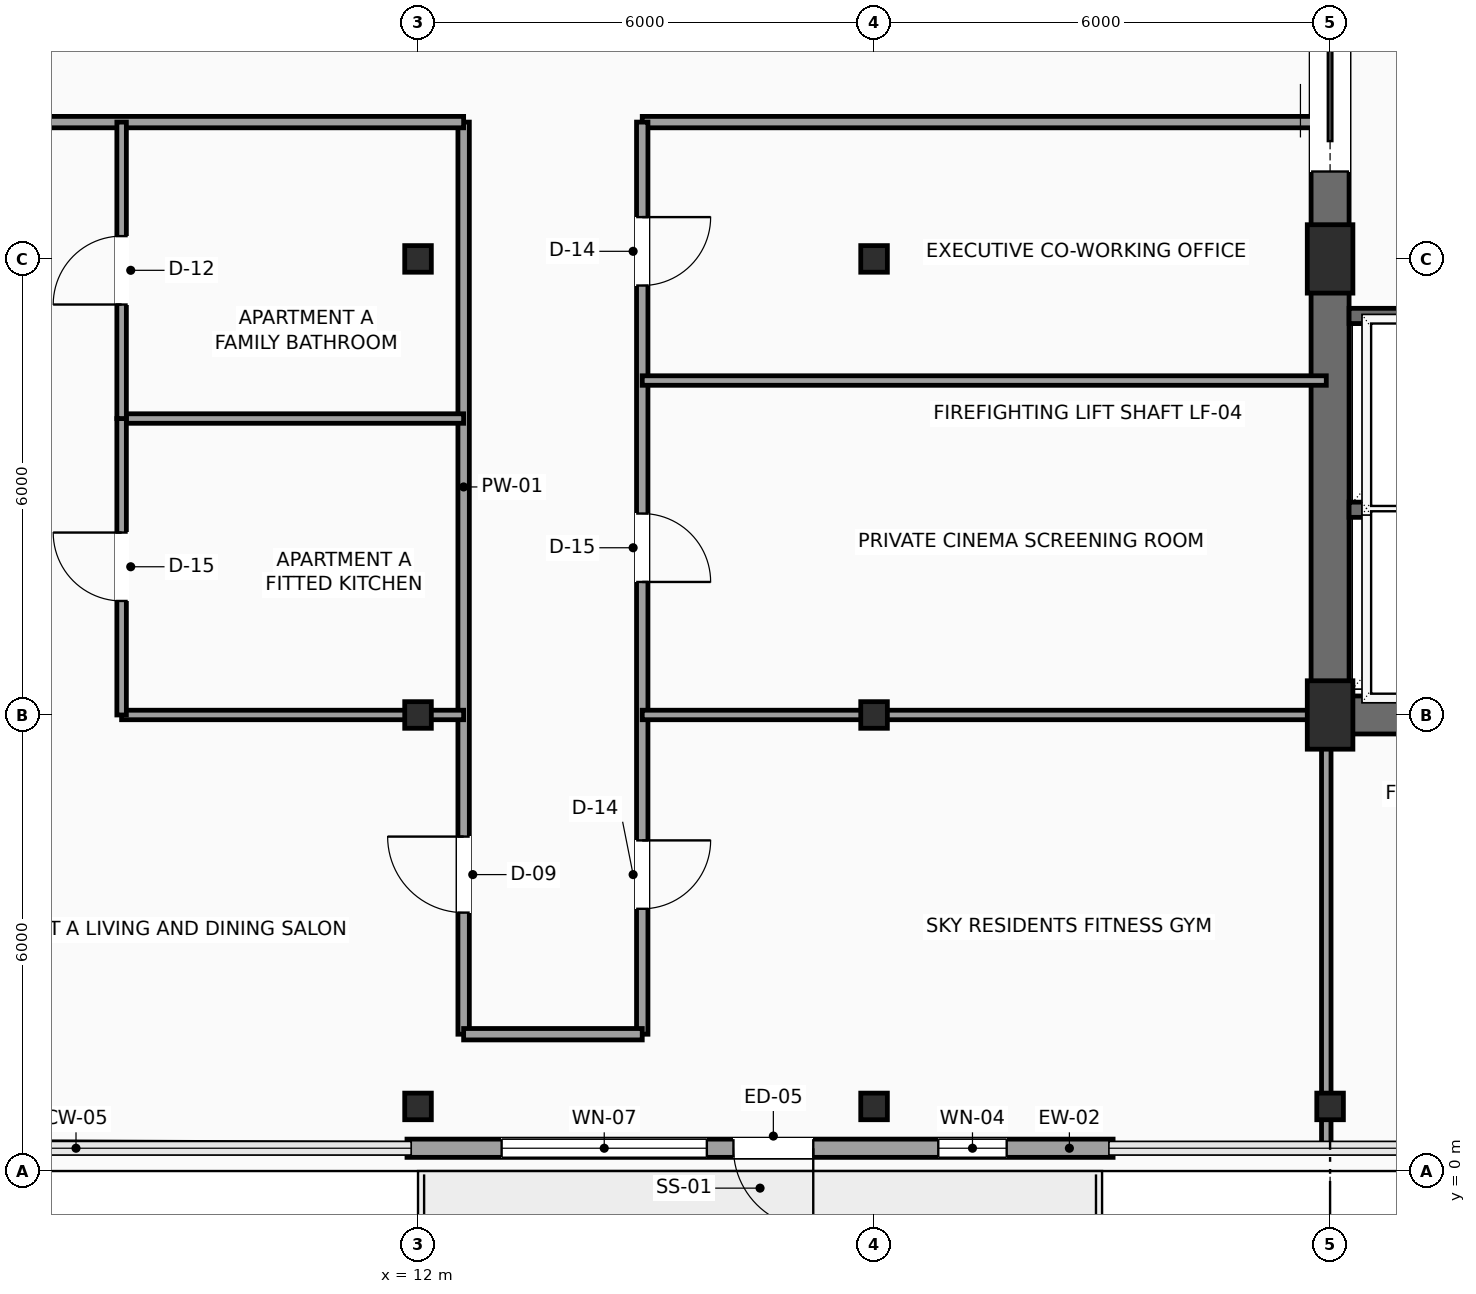
"""IFC4 building model, lengths in metres.
Left out: names, types, materials, properties, quantities, classifications, styles, units other than length and angle.
Written with IfcOpenShell. Run it as: python <this file> out.ifc"""

import sys

from ifc_helpers import new_model, si_unit, direction, frame, frame_2d, origin, origin_2d, place, context, subcontext, project, spatial, rectangle, hollow_rectangle, extrude, element, fill, save


model = new_model("IFC4")
c1 = context("Model", 3, precision=1e-05, world=origin(), true_north=direction((0.0, 1.0)))
c2 = subcontext(c1, "Body", "Model", "MODEL_VIEW")
j1 = project(units=[si_unit("LENGTHUNIT", "METRE"), si_unit("PLANEANGLEUNIT", "RADIAN")], contexts=[c1])
p1 = place(None, origin())
s1 = spatial("IfcSite", under=j1, at=p1, CompositionType="ELEMENT")
p2 = place(p1, origin())
s2 = spatial("IfcBuilding", under=s1, at=p2, CompositionType="ELEMENT")
p3 = place(p2, frame((0.0, 0.0, 267.7)))
s3 = spatial("IfcBuildingStorey", under=s2, at=p3, CompositionType="ELEMENT", Elevation=267.7)
for number, where, z_axis, x_axis in (
    (1, (24.0, 6.0, 0.0), (0.0, 0.0, 1.0), (1.0, 0.0, 0.0)),
    (2, (24.0, 12.0, 0.0), (0.0, 0.0, 1.0), (1.0, 0.0, 0.0)),
):
    element("IfcColumn", number, at=place(p3, frame(where, z_axis=z_axis, x_axis=x_axis)), inside=s3, PredefinedType="COLUMN", context=c2, shape_type="SweptSolid", body=[
        extrude(rectangle(XDim=0.6, YDim=0.9, at=origin_2d()), origin(), (0.0, 0.0, 1.0), 3.5),
    ])
for number, where, z_axis, x_axis in (
    (3, (12.0, 0.85, 0.0), (0.0, 0.0, 1.0), (1.0, 0.0, 0.0)),
    (4, (12.0, 6.0, 0.0), (0.0, 0.0, 1.0), (1.0, 0.0, 0.0)),
    (5, (12.0, 12.0, 0.0), (0.0, 0.0, 1.0), (1.0, 0.0, 0.0)),
    (6, (18.0, 0.85, 0.0), (0.0, 0.0, 1.0), (1.0, 0.0, 0.0)),
    (7, (18.0, 6.0, 0.0), (0.0, 0.0, 1.0), (1.0, 0.0, 0.0)),
    (8, (18.0, 12.0, 0.0), (0.0, 0.0, 1.0), (1.0, 0.0, 0.0)),
    (9, (24.0, 0.85, 0.0), (0.0, 0.0, 1.0), (1.0, 0.0, 0.0)),
):
    element("IfcColumn", number, at=place(p3, frame(where, z_axis=z_axis, x_axis=x_axis)), inside=s3, PredefinedType="COLUMN", context=c2, shape_type="SweptSolid", body=[
        extrude(hollow_rectangle(XDim=0.35, YDim=0.35, WallThickness=0.016, InnerFilletRadius=0.016, OuterFilletRadius=0.032, at=origin_2d()), origin(), (0.0, 0.0, 1.0), 3.5),
    ])
p4 = place(p3, frame((21.145, 0.3, 0.0), z_axis=(0.0, 0.0, 1.0), x_axis=(-1.0, 0.0, 0.0)))
e10 = element("IfcWall", 10, at=p4, inside=s3, PredefinedType="SOLIDWALL", context=c2, shape_type="SweptSolid", body=[
    extrude(rectangle(XDim=9.29, YDim=0.24, at=frame_2d((4.645, 0.0))), origin(), (0.0, 0.0, 1.0), 3.3),
])
p5 = place(p4, frame((3.945, 0.0, 0.0)))
e11 = element("IfcOpeningElement", 11, at=p5, cuts=e10, PredefinedType="OPENING", context=c2, shape_type="SweptSolid", body=[
    extrude(rectangle(XDim=1.05, YDim=2.2, at=frame_2d((0.525, 1.1))), frame((0.0, 0.13, 0.0), z_axis=(0.0, -1.0, 0.0), x_axis=(1.0, 0.0, 0.0)), (0.0, 0.0, 1.0), 0.26),
])
p6 = place(p4, frame((5.345, 0.0, 0.6)))
e12 = element("IfcOpeningElement", 12, at=p6, cuts=e10, PredefinedType="OPENING", context=c2, shape_type="SweptSolid", body=[
    extrude(rectangle(XDim=2.7, YDim=2.3, at=frame_2d((1.35, 1.15))), frame((0.0, 0.13, 0.0), z_axis=(0.0, -1.0, 0.0), x_axis=(1.0, 0.0, 0.0)), (0.0, 0.0, 1.0), 0.26),
])
p7 = place(p4, frame((1.4, 0.0, 0.6)))
e13 = element("IfcOpeningElement", 13, at=p7, cuts=e10, PredefinedType="OPENING", context=c2, shape_type="SweptSolid", body=[
    extrude(rectangle(XDim=0.9, YDim=2.2, at=frame_2d((0.45, 1.1))), frame((0.0, 0.13, 0.0), z_axis=(0.0, -1.0, 0.0), x_axis=(1.0, 0.0, 0.0)), (0.0, 0.0, 1.0), 0.26),
])
p8 = place(p3, frame((24.0, 6.0, 0.0), z_axis=(0.0, 0.0, 1.0), x_axis=(1.0, 0.0, 0.0)))
e14 = element("IfcWall", 14, at=p8, inside=s3, PredefinedType="SHEAR", context=c2, shape_type="SweptSolid", body=[
    extrude(rectangle(XDim=9.6, YDim=0.5, at=frame_2d((4.8, 0.0))), origin(), (0.0, 0.0, 1.0), 3.3),
])
p9 = place(p3, frame((24.0, 6.0, 0.0), z_axis=(0.0, 0.0, 1.0), x_axis=(0.0, 1.0, 0.0)))
e15 = element("IfcWall", 15, at=p9, inside=s3, PredefinedType="SHEAR", context=c2, shape_type="SweptSolid", body=[
    extrude(rectangle(XDim=12.0, YDim=0.5, at=frame_2d((6.0, 0.0))), origin(), (0.0, 0.0, 1.0), 3.3),
])
p10 = place(p9, frame((7.15, 0.0, 0.0)))
e16 = element("IfcOpeningElement", 16, at=p10, cuts=e15, PredefinedType="OPENING", context=c2, shape_type="SweptSolid", body=[
    extrude(rectangle(XDim=1.6, YDim=2.3, at=frame_2d((0.8, 1.15))), frame((0.0, 0.26, 0.0), z_axis=(0.0, -1.0, 0.0), x_axis=(1.0, 0.0, 0.0)), (0.0, 0.0, 1.0), 0.52),
])
for number, where, z_axis, x_axis in (
    (17, (24.25, 8.7, 0.0), (0.0, 0.0, 1.0), (1.0, 0.0, 0.0)),
    (18, (24.25, 11.25, 0.0), (0.0, 0.0, 1.0), (1.0, 0.0, 0.0)),
):
    element("IfcWall", number, at=place(p3, frame(where, z_axis=z_axis, x_axis=x_axis)), inside=s3, PredefinedType="SHEAR", context=c2, shape_type="SweptSolid", body=[
        extrude(rectangle(XDim=2.17, YDim=0.2, at=frame_2d((1.085, 0.0))), origin(), (0.0, 0.0, 1.0), 3.3),
    ])
p11 = place(p3, frame((12.6, 1.8, 0.0), z_axis=(0.0, 0.0, 1.0), x_axis=(0.0, 1.0, 0.0)))
e19 = element("IfcWall", 19, at=p11, inside=s3, PredefinedType="PARTITIONING", context=c2, shape_type="SweptSolid", body=[
    extrude(rectangle(XDim=12.0, YDim=0.15, at=frame_2d((6.0, 0.0))), origin(), (0.0, 0.0, 1.0), 3.3),
])
p12 = place(p11, frame((1.6, 0.0, 0.0)))
e20 = element("IfcOpeningElement", 20, at=p12, cuts=e19, PredefinedType="OPENING", context=c2, shape_type="SweptSolid", body=[
    extrude(rectangle(XDim=1.0, YDim=2.2, at=frame_2d((0.5, 1.1))), frame((0.0, 0.085, 0.0), z_axis=(0.0, -1.0, 0.0), x_axis=(1.0, 0.0, 0.0)), (0.0, 0.0, 1.0), 0.17),
])
p13 = place(p3, frame((12.6, 13.8, 0.0), z_axis=(0.0, 0.0, 1.0), x_axis=(-1.0, 0.0, 0.0)))
e21 = element("IfcWall", 21, at=p13, inside=s3, PredefinedType="PARTITIONING", context=c2, shape_type="SweptSolid", body=[
    extrude(rectangle(XDim=12.3, YDim=0.15, at=frame_2d((6.15, 0.0))), origin(), (0.0, 0.0, 1.0), 3.3),
])
p14 = place(p3, frame((23.95, 13.8, 0.0), z_axis=(0.0, 0.0, 1.0), x_axis=(-1.0, 0.0, 0.0)))
e22 = element("IfcWall", 22, at=p14, inside=s3, PredefinedType="PARTITIONING", context=c2, shape_type="SweptSolid", body=[
    extrude(rectangle(XDim=9.0, YDim=0.15, at=frame_2d((4.5, 0.0))), origin(), (0.0, 0.0, 1.0), 3.3),
])
p15 = place(p3, frame((14.95, 13.8, 0.0), z_axis=(0.0, 0.0, 1.0), x_axis=(0.0, -1.0, 0.0)))
e23 = element("IfcWall", 23, at=p15, inside=s3, PredefinedType="PARTITIONING", context=c2, shape_type="SweptSolid", body=[
    extrude(rectangle(XDim=12.0, YDim=0.15, at=frame_2d((6.0, 0.0))), origin(), (0.0, 0.0, 1.0), 3.3),
])
p16 = place(p15, frame((9.45, 0.0, 0.0)))
e24 = element("IfcOpeningElement", 24, at=p16, cuts=e23, PredefinedType="OPENING", context=c2, shape_type="SweptSolid", body=[
    extrude(rectangle(XDim=0.9, YDim=2.1, at=frame_2d((0.45, 1.05))), frame((0.0, 0.085, 0.0), z_axis=(0.0, -1.0, 0.0), x_axis=(1.0, 0.0, 0.0)), (0.0, 0.0, 1.0), 0.17),
])
p17 = place(p15, frame((5.15, 0.0, 0.0)))
e25 = element("IfcOpeningElement", 25, at=p17, cuts=e23, PredefinedType="OPENING", context=c2, shape_type="SweptSolid", body=[
    extrude(rectangle(XDim=0.9, YDim=2.1, at=frame_2d((0.45, 1.05))), frame((0.0, 0.085, 0.0), z_axis=(0.0, -1.0, 0.0), x_axis=(1.0, 0.0, 0.0)), (0.0, 0.0, 1.0), 0.17),
])
p18 = place(p15, frame((1.25, 0.0, 0.0)))
e26 = element("IfcOpeningElement", 26, at=p18, cuts=e23, PredefinedType="OPENING", context=c2, shape_type="SweptSolid", body=[
    extrude(rectangle(XDim=0.9, YDim=2.1, at=frame_2d((0.45, 1.05))), frame((0.0, 0.085, 0.0), z_axis=(0.0, -1.0, 0.0), x_axis=(1.0, 0.0, 0.0)), (0.0, 0.0, 1.0), 0.17),
])
p19 = place(p3, frame((14.95, 1.8, 0.0), z_axis=(0.0, 0.0, 1.0), x_axis=(-1.0, 0.0, 0.0)))
e27 = element("IfcWall", 27, at=p19, inside=s3, PredefinedType="PARTITIONING", context=c2, shape_type="SweptSolid", body=[
    extrude(rectangle(XDim=2.35, YDim=0.15, at=frame_2d((1.175, 0.0))), origin(), (0.0, 0.0, 1.0), 3.3),
])
p20 = place(p3, frame((0.3, 0.35, 0.0), z_axis=(0.0, 0.0, 1.0), x_axis=(0.999991685722, -0.004077804208, 0.0)))
e28 = element("IfcWall", 28, at=p20, inside=s3, PredefinedType="PARTITIONING", context=c2, shape_type="SweptSolid", body=[
    extrude(rectangle(XDim=11.555, YDim=0.125, at=frame_2d((5.777, 0.0))), origin(), (0.0, 0.0, 1.0), 3.3),
])
p21 = place(p3, frame((8.1, 6.0, 0.0), z_axis=(0.0, 0.0, 1.0), x_axis=(1.0, 0.0, 0.0)))
e29 = element("IfcWall", 29, at=p21, inside=s3, PredefinedType="PARTITIONING", context=c2, shape_type="SweptSolid", body=[
    extrude(rectangle(XDim=4.5, YDim=0.125, at=frame_2d((2.25, 0.0))), origin(), (0.0, 0.0, 1.0), 2.992),
])
p22 = place(p3, frame((8.1, 9.9, 0.0), z_axis=(0.0, 0.0, 1.0), x_axis=(1.0, 0.0, 0.0)))
e30 = element("IfcWall", 30, at=p22, inside=s3, PredefinedType="PARTITIONING", context=c2, shape_type="SweptSolid", body=[
    extrude(rectangle(XDim=4.5, YDim=0.125, at=frame_2d((2.25, 0.0))), origin(), (0.0, 0.0, 1.0), 3.3),
])
p23 = place(p3, frame((8.1, 6.0, 0.0), z_axis=(0.0, 0.0, 1.0), x_axis=(0.0, 1.0, 0.0)))
e31 = element("IfcWall", 31, at=p23, inside=s3, PredefinedType="PARTITIONING", context=c2, shape_type="SweptSolid", body=[
    extrude(rectangle(XDim=3.9, YDim=0.125, at=frame_2d((1.95, 0.0))), origin(), (0.0, 0.0, 1.0), 3.3),
])
p24 = place(p23, frame((1.5, 0.0, 0.0)))
e32 = element("IfcOpeningElement", 32, at=p24, cuts=e31, PredefinedType="OPENING", context=c2, shape_type="SweptSolid", body=[
    extrude(rectangle(XDim=0.9, YDim=2.1, at=frame_2d((0.45, 1.05))), frame((0.0, 0.073, 0.0), z_axis=(0.0, -1.0, 0.0), x_axis=(1.0, 0.0, 0.0)), (0.0, 0.0, 1.0), 0.145),
])
p25 = place(p3, frame((8.1, 9.9, 0.0), z_axis=(0.0, 0.0, 1.0), x_axis=(0.0, 1.0, 0.0)))
e33 = element("IfcWall", 33, at=p25, inside=s3, PredefinedType="PARTITIONING", context=c2, shape_type="SweptSolid", body=[
    extrude(rectangle(XDim=3.9, YDim=0.125, at=frame_2d((1.95, 0.0))), origin(), (0.0, 0.0, 1.0), 3.3),
])
p26 = place(p25, frame((1.5, 0.0, 0.0)))
e34 = element("IfcOpeningElement", 34, at=p26, cuts=e33, PredefinedType="OPENING", context=c2, shape_type="SweptSolid", body=[
    extrude(rectangle(XDim=0.9, YDim=2.1, at=frame_2d((0.45, 1.05))), frame((0.0, 0.073, 0.0), z_axis=(0.0, -1.0, 0.0), x_axis=(1.0, 0.0, 0.0)), (0.0, 0.0, 1.0), 0.145),
])
p27 = place(p3, frame((14.95, 6.0, 0.0), z_axis=(0.0, 0.0, 1.0), x_axis=(1.0, 0.0, 0.0)))
e35 = element("IfcWall", 35, at=p27, inside=s3, PredefinedType="PARTITIONING", context=c2, shape_type="SweptSolid", body=[
    extrude(rectangle(XDim=9.0, YDim=0.125, at=frame_2d((4.5, 0.0))), origin(), (0.0, 0.0, 1.0), 2.992),
])
p28 = place(p3, frame((23.95, 0.3, 0.0), z_axis=(0.0, 0.0, 1.0), x_axis=(0.0, 1.0, 0.0)))
e36 = element("IfcWall", 36, at=p28, inside=s3, PredefinedType="PARTITIONING", context=c2, shape_type="SweptSolid", body=[
    extrude(rectangle(XDim=5.7, YDim=0.125, at=frame_2d((2.85, 0.0))), origin(), (0.0, 0.0, 1.0), 2.967),
])
p29 = place(p3, frame((14.95, 10.4, 0.0), z_axis=(0.0, 0.0, 1.0), x_axis=(1.0, 0.0, 0.0)))
e37 = element("IfcWall", 37, at=p29, inside=s3, PredefinedType="PARTITIONING", context=c2, shape_type="SweptSolid", body=[
    extrude(rectangle(XDim=9.0, YDim=0.125, at=frame_2d((4.5, 0.0))), origin(), (0.0, 0.0, 1.0), 3.3),
])
p30 = place(p5, origin())
e38 = element("IfcDoor", 38, at=p30, inside=s3, OperationType="SINGLE_SWING_LEFT", PredefinedType="DOOR", context=c2, shape_type="SweptSolid", body=[
    extrude(rectangle(XDim=1.05, YDim=2.2, at=frame_2d((0.525, 1.1))), frame((0.0, 0.025, 0.0), z_axis=(0.0, -1.0, 0.0), x_axis=(1.0, 0.0, 0.0)), (0.0, 0.0, 1.0), 0.05),
])
fill(e11, e38)
p31 = place(p6, origin())
e39 = element("IfcWindow", 39, at=p31, inside=s3, PartitioningType="SINGLE_PANEL", PredefinedType="WINDOW", context=c2, shape_type="SweptSolid", body=[
    extrude(rectangle(XDim=2.7, YDim=2.3, at=frame_2d((1.35, 1.15))), frame((0.0, 0.03, 0.0), z_axis=(0.0, -1.0, 0.0), x_axis=(1.0, 0.0, 0.0)), (0.0, 0.0, 1.0), 0.06),
])
fill(e12, e39)
p32 = place(p7, origin())
e40 = element("IfcWindow", 40, at=p32, inside=s3, PartitioningType="SINGLE_PANEL", PredefinedType="WINDOW", context=c2, shape_type="SweptSolid", body=[
    extrude(rectangle(XDim=0.9, YDim=2.2, at=frame_2d((0.45, 1.1))), frame((0.0, 0.03, 0.0), z_axis=(0.0, -1.0, 0.0), x_axis=(1.0, 0.0, 0.0)), (0.0, 0.0, 1.0), 0.06),
])
fill(e13, e40)
p33 = place(p10, origin())
e41 = element("IfcDoor", 41, at=p33, inside=s3, OperationType="DOUBLE_DOOR_SLIDING", PredefinedType="DOOR", context=c2, shape_type="SweptSolid", body=[
    extrude(rectangle(XDim=1.6, YDim=2.3, at=frame_2d((0.8, 1.15))), frame((0.0, 0.025, 0.0), z_axis=(0.0, -1.0, 0.0), x_axis=(1.0, 0.0, 0.0)), (0.0, 0.0, 1.0), 0.05),
])
fill(e16, e41)
p34 = place(p12, origin())
e42 = element("IfcDoor", 42, at=p34, inside=s3, OperationType="SINGLE_SWING_RIGHT", PredefinedType="DOOR", context=c2, shape_type="SweptSolid", body=[
    extrude(rectangle(XDim=1.0, YDim=2.2, at=frame_2d((0.5, 1.1))), frame((0.0, 0.025, 0.0), z_axis=(0.0, -1.0, 0.0), x_axis=(1.0, 0.0, 0.0)), (0.0, 0.0, 1.0), 0.05),
])
fill(e20, e42)
p35 = place(p16, origin())
e43 = element("IfcDoor", 43, at=p35, inside=s3, OperationType="SINGLE_SWING_LEFT", PredefinedType="DOOR", context=c2, shape_type="SweptSolid", body=[
    extrude(rectangle(XDim=0.9, YDim=2.1, at=frame_2d((0.45, 1.05))), frame((0.0, 0.025, 0.0), z_axis=(0.0, -1.0, 0.0), x_axis=(1.0, 0.0, 0.0)), (0.0, 0.0, 1.0), 0.05),
])
fill(e24, e43)
p36 = place(p17, origin())
e44 = element("IfcDoor", 44, at=p36, inside=s3, OperationType="SINGLE_SWING_RIGHT", PredefinedType="DOOR", context=c2, shape_type="SweptSolid", body=[
    extrude(rectangle(XDim=0.9, YDim=2.1, at=frame_2d((0.45, 1.05))), frame((0.0, 0.025, 0.0), z_axis=(0.0, -1.0, 0.0), x_axis=(1.0, 0.0, 0.0)), (0.0, 0.0, 1.0), 0.05),
])
fill(e25, e44)
p37 = place(p18, origin())
e45 = element("IfcDoor", 45, at=p37, inside=s3, OperationType="SINGLE_SWING_LEFT", PredefinedType="DOOR", context=c2, shape_type="SweptSolid", body=[
    extrude(rectangle(XDim=0.9, YDim=2.1, at=frame_2d((0.45, 1.05))), frame((0.0, 0.025, 0.0), z_axis=(0.0, -1.0, 0.0), x_axis=(1.0, 0.0, 0.0)), (0.0, 0.0, 1.0), 0.05),
])
fill(e26, e45)
p38 = place(p24, origin())
e46 = element("IfcDoor", 46, at=p38, inside=s3, OperationType="SINGLE_SWING_RIGHT", PredefinedType="DOOR", context=c2, shape_type="SweptSolid", body=[
    extrude(rectangle(XDim=0.9, YDim=2.1, at=frame_2d((0.45, 1.05))), frame((0.0, 0.025, 0.0), z_axis=(0.0, -1.0, 0.0), x_axis=(1.0, 0.0, 0.0)), (0.0, 0.0, 1.0), 0.05),
])
fill(e32, e46)
p39 = place(p26, origin())
e47 = element("IfcDoor", 47, at=p39, inside=s3, OperationType="SINGLE_SWING_LEFT", PredefinedType="DOOR", context=c2, shape_type="SweptSolid", body=[
    extrude(rectangle(XDim=0.9, YDim=2.1, at=frame_2d((0.45, 1.05))), frame((0.0, 0.025, 0.0), z_axis=(0.0, -1.0, 0.0), x_axis=(1.0, 0.0, 0.0)), (0.0, 0.0, 1.0), 0.05),
])
fill(e34, e47)
save(model, sys.argv[1])
